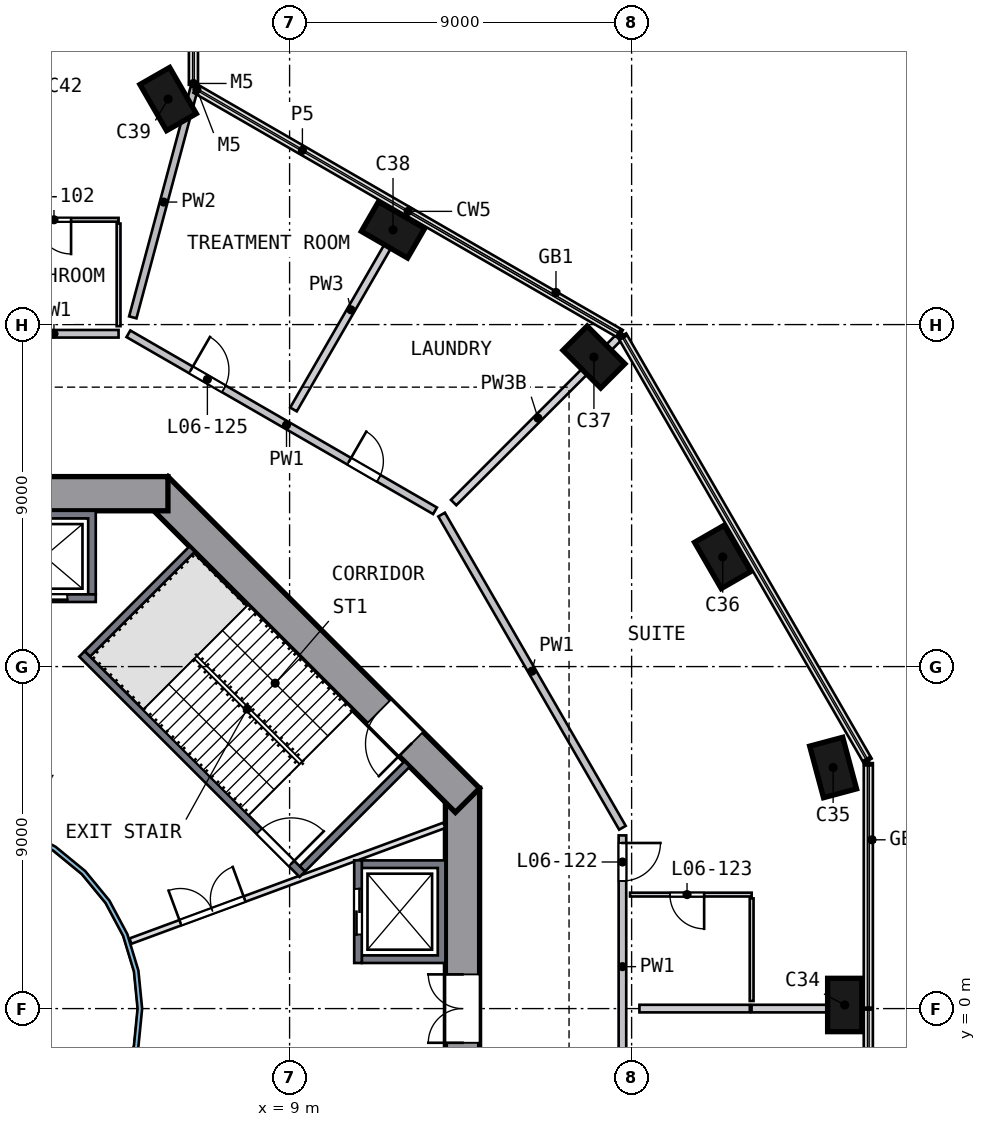
"""IFC4 building model, lengths in metres.
Left out: names, types, materials, properties, quantities, classifications, styles, units other than length and angle.
Written with IfcOpenShell. Run it as: python <this file> out.ifc"""

import sys

from ifc_helpers import new_model, si_unit, direction, frame, frame_2d, origin, origin_2d, place, context, subcontext, project, spatial, polyline, rectangle, outline, extrude, element, fill, save


model = new_model("IFC4")
c1 = context("Model", 3, precision=1e-05, world=origin(), true_north=direction((0.0, 1.0)))
c2 = subcontext(c1, "Body", "Model", "MODEL_VIEW")
j1 = project(units=[si_unit("LENGTHUNIT", "METRE"), si_unit("PLANEANGLEUNIT", "RADIAN")], contexts=[c1])
p1 = place(None, origin())
s1 = spatial("IfcSite", under=j1, at=p1, CompositionType="ELEMENT")
p2 = place(p1, origin())
s2 = spatial("IfcBuilding", under=s1, at=p2, CompositionType="ELEMENT")
p3 = place(p2, frame((0.0, 0.0, 34.0)))
s3 = spatial("IfcBuildingStorey", under=s2, at=p3, CompositionType="ELEMENT", Elevation=34.0)
p4 = place(p3, frame((23.608, 0.0, 0.0), z_axis=(-0.000674622, 0.078878899, 0.996883977), x_axis=(-0.000122014, 0.99688419, -0.078878998)))
e1 = element("IfcColumn", 1, at=p4, inside=s3, PredefinedType="COLUMN", context=c2, shape_type="SweptSolid", body=[
    extrude(rectangle(XDim=1.4, YDim=0.9, at=origin_2d()), origin(), (0.0, 0.0, 1.0), 4.705),
])
p5 = place(p3, frame((23.328, 6.251, 0.0), z_axis=(-0.021532865, 0.077777746, 0.996738159), x_axis=(0.257834381, -0.962812988, 0.080700569)))
e2 = element("IfcColumn", 2, at=p5, inside=s3, PredefinedType="COLUMN", context=c2, shape_type="SweptSolid", body=[
    extrude(rectangle(XDim=1.4, YDim=0.9, at=origin_2d()), origin(), (0.0, 0.0, 1.0), 4.705),
])
p6 = place(p3, frame((20.445, 11.804, 0.0), z_axis=(-0.040010426, 0.067929504, 0.99688753), x_axis=(-0.498670621, 0.863199165, -0.078834084)))
e3 = element("IfcColumn", 3, at=p6, inside=s3, PredefinedType="COLUMN", context=c2, shape_type="SweptSolid", body=[
    extrude(rectangle(XDim=1.4, YDim=0.9, at=origin_2d()), origin(), (0.0, 0.0, 1.0), 4.705),
])
p7 = place(p3, frame((17.077, 17.077, 0.0), z_axis=(-0.057490254, 0.056608184, 0.996739878), x_axis=(0.704306489, -0.705296544, 0.08067934)))
e4 = element("IfcColumn", 4, at=p7, inside=s3, PredefinedType="COLUMN", context=c2, shape_type="SweptSolid", body=[
    extrude(rectangle(XDim=1.4, YDim=0.9, at=origin_2d()), origin(), (0.0, 0.0, 1.0), 4.705),
])
p8 = place(p3, frame((11.804, 20.445, 0.0), z_axis=(-0.068655708, 0.038868575, 0.996882956), x_axis=(-0.863336283, 0.498424045, -0.078891906)))
e5 = element("IfcColumn", 5, at=p8, inside=s3, PredefinedType="COLUMN", context=c2, shape_type="SweptSolid", body=[
    extrude(rectangle(XDim=1.4, YDim=0.9, at=origin_2d()), origin(), (0.0, 0.0, 1.0), 4.705),
])
p9 = place(p3, frame((5.9, 23.912, 0.0), z_axis=(-0.079998823, 0.019039928, 0.996613099), x_axis=(0.49616409, -0.866396292, 0.056379618)))
e6 = element("IfcColumn", 6, at=p9, inside=s3, PredefinedType="COLUMN", context=c2, shape_type="SweptSolid", body=[
    extrude(rectangle(XDim=1.4, YDim=0.9, at=origin_2d()), origin(), (0.0, 0.0, 1.0), 4.706),
])
p10 = place(p3, frame((13.55, -5.799, 0.0), z_axis=(0.0, 0.0, 1.0), x_axis=(0.0, 1.0, 0.0)))
e7 = element("IfcWall", 7, at=p10, inside=s3, PredefinedType="SHEAR", context=c2, shape_type="SweptSolid", body=[
    extrude(rectangle(XDim=11.598, YDim=0.9, at=frame_2d((5.799, 0.0))), origin(), (0.0, 0.0, 1.0), 5.0),
])
p11 = place(p10, frame((4.899, 0.0, 0.0)))
e8 = element("IfcOpeningElement", 8, at=p11, cuts=e7, PredefinedType="OPENING", context=c2, shape_type="SweptSolid", body=[
    extrude(rectangle(XDim=1.8, YDim=2.1, at=frame_2d((0.9, 1.05))), frame((0.0, 0.46, 0.0), z_axis=(0.0, -1.0, 0.0), x_axis=(1.0, 0.0, 0.0)), (0.0, 0.0, 1.0), 0.92),
])
p12 = place(p3, frame((13.682, 5.481, 0.0), z_axis=(0.0, 0.0, 1.0), x_axis=(-0.707106781, 0.707106781, 0.0)))
e9 = element("IfcWall", 9, at=p12, inside=s3, PredefinedType="SHEAR", context=c2, shape_type="SweptSolid", body=[
    extrude(rectangle(XDim=11.598, YDim=0.9, at=frame_2d((5.799, 0.0))), origin(), (0.0, 0.0, 1.0), 5.0),
])
p13 = place(p12, frame((2.099, 0.0, 0.0)))
e10 = element("IfcOpeningElement", 10, at=p13, cuts=e9, PredefinedType="OPENING", context=c2, shape_type="SweptSolid", body=[
    extrude(rectangle(XDim=1.2, YDim=2.1, at=frame_2d((0.6, 1.05))), frame((0.0, 0.46, 0.0), z_axis=(0.0, -1.0, 0.0), x_axis=(1.0, 0.0, 0.0)), (0.0, 0.0, 1.0), 0.92),
])
p14 = place(p3, frame((5.799, 13.55, 0.0), z_axis=(0.0, 0.0, 1.0), x_axis=(-1.0, 0.0, 0.0)))
e11 = element("IfcWall", 11, at=p14, inside=s3, PredefinedType="SHEAR", context=c2, shape_type="SweptSolid", body=[
    extrude(rectangle(XDim=11.598, YDim=0.9, at=frame_2d((5.799, 0.0))), origin(), (0.0, 0.0, 1.0), 5.0),
])
p15 = place(p14, frame((4.899, 0.0, 0.0)))
e12 = element("IfcOpeningElement", 12, at=p15, cuts=e11, PredefinedType="OPENING", context=c2, shape_type="SweptSolid", body=[
    extrude(rectangle(XDim=1.8, YDim=2.1, at=frame_2d((0.9, 1.05))), frame((0.0, 0.46, 0.0), z_axis=(0.0, -1.0, 0.0), x_axis=(1.0, 0.0, 0.0)), (0.0, 0.0, 1.0), 0.92),
])
p16 = place(p3, origin())
e13 = element("IfcWall", 13, at=p16, inside=s3, PredefinedType="SOLIDWALL", context=c2, shape_type="SweptSolid", body=[
    extrude(outline(polyline([(13.1, 3.9), (13.1, 1.2), (10.9, 1.2), (10.9, 1.4), (12.9, 1.4), (12.9, 3.7), (10.9, 3.7), (10.9, 3.9), (13.1, 3.9)])), origin(), (0.0, 0.0, 1.0), 4.69),
])
p17 = place(p3, frame((10.8, 1.2, 0.0), z_axis=(0.0, 0.0, 1.0), x_axis=(0.0, 1.0, 0.0)))
e14 = element("IfcWall", 14, at=p17, inside=s3, PredefinedType="SOLIDWALL", context=c2, shape_type="SweptSolid", body=[
    extrude(rectangle(XDim=2.7, YDim=0.2, at=frame_2d((1.35, 0.0))), origin(), (0.0, 0.0, 1.0), 4.69),
])
p18 = place(p17, frame((0.75, 0.0, 0.0)))
e15 = element("IfcOpeningElement", 15, at=p18, cuts=e14, PredefinedType="OPENING", context=c2, shape_type="SweptSolid", body=[
    extrude(rectangle(XDim=1.2, YDim=2.1, at=frame_2d((0.6, 1.05))), frame((0.0, 0.11, 0.0), z_axis=(0.0, -1.0, 0.0), x_axis=(1.0, 0.0, 0.0)), (0.0, 0.0, 1.0), 0.22),
])
p19 = place(p3, origin())
e16 = element("IfcWall", 16, at=p19, inside=s3, PredefinedType="SOLIDWALL", context=c2, shape_type="SweptSolid", body=[
    extrude(outline(polyline([(3.9, 13.1), (3.9, 10.9), (3.7, 10.9), (3.7, 12.9), (1.4, 12.9), (1.4, 10.9), (1.2, 10.9), (1.2, 13.1), (3.9, 13.1)])), origin(), (0.0, 0.0, 1.0), 4.69),
])
p20 = place(p3, frame((1.2, 10.8, 0.0), z_axis=(0.0, 0.0, 1.0), x_axis=(1.0, 0.0, 0.0)))
e17 = element("IfcWall", 17, at=p20, inside=s3, PredefinedType="SOLIDWALL", context=c2, shape_type="SweptSolid", body=[
    extrude(rectangle(XDim=2.7, YDim=0.2, at=frame_2d((1.35, 0.0))), origin(), (0.0, 0.0, 1.0), 4.69),
])
p21 = place(p20, frame((0.75, 0.0, 0.0)))
e18 = element("IfcOpeningElement", 18, at=p21, cuts=e17, PredefinedType="OPENING", context=c2, shape_type="SweptSolid", body=[
    extrude(rectangle(XDim=1.2, YDim=2.1, at=frame_2d((0.6, 1.05))), frame((0.0, 0.11, 0.0), z_axis=(0.0, -1.0, 0.0), x_axis=(1.0, 0.0, 0.0)), (0.0, 0.0, 1.0), 0.22),
])
p22 = place(p3, frame((3.535, 9.334, 0.0), z_axis=(0.0, 0.0, 1.0), x_axis=(0.707106781, -0.707106781, 0.0)))
e19 = element("IfcWall", 19, at=p22, inside=s3, PredefinedType="SOLIDWALL", context=c2, shape_type="SweptSolid", body=[
    extrude(rectangle(XDim=8.2, YDim=0.2, at=frame_2d((4.1, 0.0))), origin(), (0.0, 0.0, 1.0), 4.69),
])
p23 = place(p22, frame((6.6, 0.0, 0.0)))
e20 = element("IfcOpeningElement", 20, at=p23, cuts=e19, PredefinedType="OPENING", context=c2, shape_type="SweptSolid", body=[
    extrude(rectangle(XDim=1.2, YDim=2.1, at=frame_2d((0.6, 1.05))), frame((0.0, 0.11, 0.0), z_axis=(0.0, -1.0, 0.0), x_axis=(1.0, 0.0, 0.0)), (0.0, 0.0, 1.0), 0.22),
])
for number, where, z_axis, x_axis in (
    (21, (9.334, 3.677, 0.0), (0.0, 0.0, 1.0), (0.707, 0.707, 0.0)),
    (22, (3.677, 9.334, 0.0), (0.0, 0.0, 1.0), (0.707, 0.707, 0.0)),
):
    element("IfcWall", number, at=place(p3, frame(where, z_axis=z_axis, x_axis=x_axis)), inside=s3, PredefinedType="SOLIDWALL", context=c2, shape_type="SweptSolid", body=[
        extrude(rectangle(XDim=3.9, YDim=0.2, at=frame_2d((1.95, 0.0))), origin(), (0.0, 0.0, 1.0), 4.69),
    ])
p24 = place(p3, frame((4.813, 1.776, 0.0), z_axis=(0.0, 0.0, 1.0), x_axis=(0.93819293, 0.346112737, 0.0)))
e23 = element("IfcWall", 23, at=p24, inside=s3, PredefinedType="PARTITIONING", context=c2, shape_type="SweptSolid", body=[
    extrude(rectangle(XDim=8.803, YDim=0.15, at=frame_2d((4.402, 0.0))), origin(), (0.0, 0.0, 1.0), 4.69),
])
p25 = place(p24, frame((1.4, 0.0, 0.0)))
e24 = element("IfcOpeningElement", 24, at=p25, cuts=e23, PredefinedType="OPENING", context=c2, shape_type="SweptSolid", body=[
    extrude(rectangle(XDim=1.8, YDim=2.1, at=frame_2d((0.9, 1.05))), frame((0.0, 0.085, 0.0), z_axis=(0.0, -1.0, 0.0), x_axis=(1.0, 0.0, 0.0)), (0.0, 0.0, 1.0), 0.17),
])
p26 = place(p3, origin())
e25 = element("IfcWall", 25, at=p26, inside=s3, PredefinedType="SOLIDWALL", context=c2, shape_type="SweptSolid", body=[
    extrude(outline(polyline([(5.021, -0.999), (4.73, -1.959), (4.257, -2.844), (3.62, -3.62), (2.844, -4.257), (1.959, -4.73), (0.999, -5.021), (0.0, -5.12), (-0.999, -5.021), (-1.959, -4.73), (-2.844, -4.257), (-3.62, -3.62), (-4.257, -2.844), (-4.73, -1.959), (-5.021, -0.999), (-5.12, 0.0), (-5.021, 0.999), (-4.73, 1.959), (-4.257, 2.844), (-3.62, 3.62), (-2.844, 4.257), (-1.959, 4.73), (-0.999, 5.021), (0.0, 5.12), (0.999, 5.021), (1.959, 4.73), (2.844, 4.257), (3.62, 3.62), (4.257, 2.844), (4.73, 1.959), (5.021, 0.999), (5.12, 0.0), (5.021, -0.999)]), holes=[polyline([(4.904, 0.976), (4.619, 1.913), (4.157, 2.778), (3.535, 3.535), (2.778, 4.157), (1.913, 4.619), (0.976, 4.904), (0.0, 5.0), (-0.976, 4.904), (-1.913, 4.619), (-2.778, 4.157), (-3.535, 3.535), (-4.157, 2.778), (-4.619, 1.913), (-4.904, 0.976), (-5.0, 0.0), (-4.904, -0.976), (-4.619, -1.913), (-4.157, -2.778), (-3.535, -3.535), (-2.778, -4.157), (-1.913, -4.619), (-0.976, -4.904), (0.0, -5.0), (0.976, -4.904), (1.913, -4.619), (2.778, -4.157), (3.535, -3.535), (4.157, -2.778), (4.619, -1.913), (4.904, -0.976), (5.0, 0.0), (4.904, 0.976)])]), origin(), (0.0, 0.0, 1.0), 4.69),
])
p27 = place(p3, frame((4.5, 17.758, 0.0), z_axis=(0.0, 0.0, 1.0), x_axis=(-1.0, 0.0, 0.0)))
e26 = element("IfcWall", 26, at=p27, inside=s3, PredefinedType="SOLIDWALL", context=c2, shape_type="SweptSolid", body=[
    extrude(rectangle(XDim=3.4, YDim=0.2, at=frame_2d((1.7, 0.0))), origin(), (0.0, 0.0, 1.0), 4.69),
])
p28 = place(p3, frame((4.758, 17.758, 0.0), z_axis=(0.0, 0.0, 1.0), x_axis=(0.866035038, -0.499983313, 0.0)))
e27 = element("IfcWall", 27, at=p28, inside=s3, PredefinedType="SOLIDWALL", context=c2, shape_type="SweptSolid", body=[
    extrude(rectangle(XDim=9.317, YDim=0.2, at=frame_2d((4.658, 0.0))), origin(), (0.0, 0.0, 1.0), 4.69),
])
p29 = place(p28, frame((6.708, 0.0, 0.0)))
e28 = element("IfcOpeningElement", 28, at=p29, cuts=e27, PredefinedType="OPENING", context=c2, shape_type="SweptSolid", body=[
    extrude(rectangle(XDim=0.9, YDim=2.1, at=frame_2d((0.45, 1.05))), frame((0.0, 0.11, 0.0), z_axis=(0.0, -1.0, 0.0), x_axis=(1.0, 0.0, 0.0)), (0.0, 0.0, 1.0), 0.22),
])
p30 = place(p28, frame((1.9, 0.0, 0.0)))
e29 = element("IfcOpeningElement", 29, at=p30, cuts=e27, PredefinedType="OPENING", context=c2, shape_type="SweptSolid", body=[
    extrude(rectangle(XDim=1.0, YDim=2.1, at=frame_2d((0.5, 1.05))), frame((0.0, 0.11, 0.0), z_axis=(0.0, -1.0, 0.0), x_axis=(1.0, 0.0, 0.0)), (0.0, 0.0, 1.0), 0.22),
])
p31 = place(p3, frame((17.758, 4.759, 0.0), z_axis=(0.0, 0.0, 1.0), x_axis=(-0.499999313, 0.8660258, 0.0)))
e30 = element("IfcWall", 30, at=p31, inside=s3, PredefinedType="SOLIDWALL", context=c2, shape_type="SweptSolid", body=[
    extrude(rectangle(XDim=9.516, YDim=0.2, at=frame_2d((4.758, 0.0))), origin(), (0.0, 0.0, 1.0), 4.69),
])
p32 = place(p3, frame((17.758, 4.558, 0.0), z_axis=(0.0, 0.0, 1.0), x_axis=(0.0, -1.0, 0.0)))
e31 = element("IfcWall", 31, at=p32, inside=s3, PredefinedType="SOLIDWALL", context=c2, shape_type="SweptSolid", body=[
    extrude(rectangle(XDim=9.116, YDim=0.2, at=frame_2d((4.558, 0.0))), origin(), (0.0, 0.0, 1.0), 4.69),
])
p33 = place(p32, frame((0.2, 0.0, 0.0)))
e32 = element("IfcOpeningElement", 32, at=p33, cuts=e31, PredefinedType="OPENING", context=c2, shape_type="SweptSolid", body=[
    extrude(rectangle(XDim=1.0, YDim=2.1, at=frame_2d((0.5, 1.05))), frame((0.0, 0.11, 0.0), z_axis=(0.0, -1.0, 0.0), x_axis=(1.0, 0.0, 0.0)), (0.0, 0.0, 1.0), 0.22),
])
p34 = place(p32, frame((8.008, 0.0, 0.0)))
e33 = element("IfcOpeningElement", 33, at=p34, cuts=e31, PredefinedType="OPENING", context=c2, shape_type="SweptSolid", body=[
    extrude(rectangle(XDim=0.9, YDim=2.1, at=frame_2d((0.45, 1.05))), frame((0.0, 0.11, 0.0), z_axis=(0.0, -1.0, 0.0), x_axis=(1.0, 0.0, 0.0)), (0.0, 0.0, 1.0), 0.22),
])
p35 = place(p32, frame((5.708, 0.0, 0.0)))
e34 = element("IfcOpeningElement", 34, at=p35, cuts=e31, PredefinedType="OPENING", context=c2, shape_type="SweptSolid", body=[
    extrude(rectangle(XDim=0.9, YDim=2.1, at=frame_2d((0.45, 1.05))), frame((0.0, 0.11, 0.0), z_axis=(0.0, -1.0, 0.0), x_axis=(1.0, 0.0, 0.0)), (0.0, 0.0, 1.0), 0.22),
])
p36 = place(p3, frame((4.874, 18.19, 0.0), z_axis=(0.0, 0.0, 1.0), x_axis=(0.258833215, 0.965922029, 0.0)))
e35 = element("IfcWall", 35, at=p36, inside=s3, PredefinedType="SOLIDWALL", context=c2, shape_type="SweptSolid", body=[
    extrude(rectangle(XDim=6.282, YDim=0.2, at=frame_2d((3.141, 0.0))), origin(), (0.0, 0.0, 1.0), 4.69),
])
p37 = place(p3, frame((4.5, 20.758, 0.0), z_axis=(0.0, 0.0, 1.0), x_axis=(-1.0, 0.0, 0.0)))
e36 = element("IfcWall", 36, at=p37, inside=s3, PredefinedType="PARTITIONING", context=c2, shape_type="SweptSolid", body=[
    extrude(rectangle(XDim=3.2, YDim=0.1, at=frame_2d((1.6, 0.0))), origin(), (0.0, 0.0, 1.0), 4.69),
])
p38 = place(p37, frame((1.25, 0.0, 0.0)))
e37 = element("IfcOpeningElement", 37, at=p38, cuts=e36, PredefinedType="OPENING", context=c2, shape_type="SweptSolid", body=[
    extrude(rectangle(XDim=0.9, YDim=2.1, at=frame_2d((0.45, 1.05))), frame((0.0, 0.06, 0.0), z_axis=(0.0, -1.0, 0.0), x_axis=(1.0, 0.0, 0.0)), (0.0, 0.0, 1.0), 0.12),
])
p39 = place(p3, frame((4.5, 20.658, 0.0), z_axis=(0.0, 0.0, 1.0), x_axis=(0.0, -1.0, 0.0)))
e38 = element("IfcWall", 38, at=p39, inside=s3, PredefinedType="PARTITIONING", context=c2, shape_type="SweptSolid", body=[
    extrude(rectangle(XDim=2.7, YDim=0.1, at=frame_2d((1.35, 0.0))), origin(), (0.0, 0.0, 1.0), 4.69),
])
p40 = place(p3, frame((21.158, 3.0, 0.0), z_axis=(0.0, 0.0, 1.0), x_axis=(-1.0, 0.0, 0.0)))
e39 = element("IfcWall", 39, at=p40, inside=s3, PredefinedType="PARTITIONING", context=c2, shape_type="SweptSolid", body=[
    extrude(rectangle(XDim=3.2, YDim=0.1, at=frame_2d((1.6, 0.0))), origin(), (0.0, 0.0, 1.0), 4.69),
])
p41 = place(p40, frame((1.25, 0.0, 0.0)))
e40 = element("IfcOpeningElement", 40, at=p41, cuts=e39, PredefinedType="OPENING", context=c2, shape_type="SweptSolid", body=[
    extrude(rectangle(XDim=0.9, YDim=2.1, at=frame_2d((0.45, 1.05))), frame((0.0, 0.06, 0.0), z_axis=(0.0, -1.0, 0.0), x_axis=(1.0, 0.0, 0.0)), (0.0, 0.0, 1.0), 0.12),
])
p42 = place(p3, frame((21.158, 2.9, 0.0), z_axis=(0.0, 0.0, 1.0), x_axis=(0.0, -1.0, 0.0)))
e41 = element("IfcWall", 41, at=p42, inside=s3, PredefinedType="PARTITIONING", context=c2, shape_type="SweptSolid", body=[
    extrude(rectangle(XDim=2.7, YDim=0.1, at=frame_2d((1.35, 0.0))), origin(), (0.0, 0.0, 1.0), 4.69),
])
p43 = place(p3, frame((9.103, 15.767, 0.0), z_axis=(0.0, 0.0, 1.0), x_axis=(0.500008765, 0.866020343, 0.0)))
e42 = element("IfcWall", 42, at=p43, inside=s3, PredefinedType="SOLIDWALL", context=c2, shape_type="SweptSolid", body=[
    extrude(rectangle(XDim=6.053, YDim=0.2, at=frame_2d((3.026, 0.0))), origin(), (0.0, 0.0, 1.0), 4.69),
])
p44 = place(p3, frame((17.758, 17.758, 0.0), z_axis=(0.0, 0.0, 1.0), x_axis=(-0.707106781, -0.707106781, 0.0)))
e43 = element("IfcWall", 43, at=p44, inside=s3, PredefinedType="SOLIDWALL", context=c2, shape_type="SweptSolid", body=[
    extrude(rectangle(XDim=6.282, YDim=0.2, at=frame_2d((3.141, 0.0))), origin(), (0.0, 0.0, 1.0), 4.19),
])
p45 = place(p3, frame((18.206, 0.0, 0.0), z_axis=(0.0, 0.0, 1.0), x_axis=(1.0, 0.0, 0.0)))
e44 = element("IfcWall", 44, at=p45, inside=s3, PredefinedType="SOLIDWALL", context=c2, shape_type="SweptSolid", body=[
    extrude(rectangle(XDim=2.905, YDim=0.2, at=frame_2d((1.452, 0.0))), origin(), (0.0, 0.0, 1.0), 4.69),
])
p46 = place(p3, frame((21.156, 0.0, 0.0), z_axis=(0.0, 0.0, 1.0), x_axis=(1.0, 0.0, 0.0)))
e45 = element("IfcWall", 45, at=p46, inside=s3, PredefinedType="SOLIDWALL", context=c2, shape_type="SweptSolid", body=[
    extrude(rectangle(XDim=3.102, YDim=0.2, at=frame_2d((1.551, 0.0))), origin(), (0.0, 0.0, 1.0), 4.69),
])
p47 = place(p18, origin())
e46 = element("IfcDoor", 46, at=p47, inside=s3, OperationType="DOUBLE_DOOR_SLIDING", PredefinedType="DOOR", context=c2, shape_type="SweptSolid", body=[
    extrude(rectangle(XDim=1.2, YDim=2.1, at=frame_2d((0.6, 1.05))), frame((0.0, 0.025, 0.0), z_axis=(0.0, -1.0, 0.0), x_axis=(1.0, 0.0, 0.0)), (0.0, 0.0, 1.0), 0.05),
])
fill(e15, e46)
p48 = place(p21, origin())
e47 = element("IfcDoor", 47, at=p48, inside=s3, OperationType="DOUBLE_DOOR_SLIDING", PredefinedType="DOOR", context=c2, shape_type="SweptSolid", body=[
    extrude(rectangle(XDim=1.2, YDim=2.1, at=frame_2d((0.6, 1.05))), frame((0.0, 0.025, 0.0), z_axis=(0.0, -1.0, 0.0), x_axis=(1.0, 0.0, 0.0)), (0.0, 0.0, 1.0), 0.05),
])
fill(e18, e47)
p49 = place(p23, origin())
e48 = element("IfcDoor", 48, at=p49, inside=s3, OperationType="SINGLE_SWING_RIGHT", PredefinedType="DOOR", context=c2, shape_type="SweptSolid", body=[
    extrude(rectangle(XDim=1.2, YDim=2.1, at=frame_2d((0.6, 1.05))), frame((0.0, 0.025, 0.0), z_axis=(0.0, -1.0, 0.0), x_axis=(1.0, 0.0, 0.0)), (0.0, 0.0, 1.0), 0.05),
])
fill(e20, e48)
p50 = place(p11, origin())
e49 = element("IfcDoor", 49, at=p50, inside=s3, OperationType="DOUBLE_DOOR_SINGLE_SWING", PredefinedType="DOOR", context=c2, shape_type="SweptSolid", body=[
    extrude(rectangle(XDim=1.8, YDim=2.1, at=frame_2d((0.9, 1.05))), frame((0.0, 0.025, 0.0), z_axis=(0.0, -1.0, 0.0), x_axis=(1.0, 0.0, 0.0)), (0.0, 0.0, 1.0), 0.05),
])
fill(e8, e49)
p51 = place(p13, origin())
e50 = element("IfcDoor", 50, at=p51, inside=s3, OperationType="SINGLE_SWING_LEFT", PredefinedType="DOOR", context=c2, shape_type="SweptSolid", body=[
    extrude(rectangle(XDim=1.2, YDim=2.1, at=frame_2d((0.6, 1.05))), frame((0.0, 0.025, 0.0), z_axis=(0.0, -1.0, 0.0), x_axis=(1.0, 0.0, 0.0)), (0.0, 0.0, 1.0), 0.05),
])
fill(e10, e50)
p52 = place(p25, origin())
e51 = element("IfcDoor", 51, at=p52, inside=s3, OperationType="DOUBLE_DOOR_SINGLE_SWING", PredefinedType="DOOR", context=c2, shape_type="SweptSolid", body=[
    extrude(rectangle(XDim=1.8, YDim=2.1, at=frame_2d((0.9, 1.05))), frame((0.0, 0.025, 0.0), z_axis=(0.0, -1.0, 0.0), x_axis=(1.0, 0.0, 0.0)), (0.0, 0.0, 1.0), 0.05),
])
fill(e24, e51)
p53 = place(p38, origin())
e52 = element("IfcDoor", 52, at=p53, inside=s3, OperationType="SINGLE_SWING_LEFT", PredefinedType="DOOR", context=c2, shape_type="SweptSolid", body=[
    extrude(rectangle(XDim=0.9, YDim=2.1, at=frame_2d((0.45, 1.05))), frame((0.0, 0.025, 0.0), z_axis=(0.0, -1.0, 0.0), x_axis=(1.0, 0.0, 0.0)), (0.0, 0.0, 1.0), 0.05),
])
fill(e37, e52)
p54 = place(p33, origin())
e53 = element("IfcDoor", 53, at=p54, inside=s3, OperationType="SINGLE_SWING_LEFT", PredefinedType="DOOR", context=c2, shape_type="SweptSolid", body=[
    extrude(rectangle(XDim=1.0, YDim=2.1, at=frame_2d((0.5, 1.05))), frame((0.0, 0.025, 0.0), z_axis=(0.0, -1.0, 0.0), x_axis=(1.0, 0.0, 0.0)), (0.0, 0.0, 1.0), 0.05),
])
fill(e32, e53)
p55 = place(p41, origin())
e54 = element("IfcDoor", 54, at=p55, inside=s3, OperationType="SINGLE_SWING_LEFT", PredefinedType="DOOR", context=c2, shape_type="SweptSolid", body=[
    extrude(rectangle(XDim=0.9, YDim=2.1, at=frame_2d((0.45, 1.05))), frame((0.0, 0.025, 0.0), z_axis=(0.0, -1.0, 0.0), x_axis=(1.0, 0.0, 0.0)), (0.0, 0.0, 1.0), 0.05),
])
fill(e40, e54)
p56 = place(p29, origin())
e55 = element("IfcDoor", 55, at=p56, inside=s3, OperationType="SINGLE_SWING_LEFT", PredefinedType="DOOR", context=c2, shape_type="SweptSolid", body=[
    extrude(rectangle(XDim=0.9, YDim=2.1, at=frame_2d((0.45, 1.05))), frame((0.0, 0.025, 0.0), z_axis=(0.0, -1.0, 0.0), x_axis=(1.0, 0.0, 0.0)), (0.0, 0.0, 1.0), 0.05),
])
fill(e28, e55)
p57 = place(p30, origin())
e56 = element("IfcDoor", 56, at=p57, inside=s3, OperationType="SINGLE_SWING_LEFT", PredefinedType="DOOR", context=c2, shape_type="SweptSolid", body=[
    extrude(rectangle(XDim=1.0, YDim=2.1, at=frame_2d((0.5, 1.05))), frame((0.0, 0.025, 0.0), z_axis=(0.0, -1.0, 0.0), x_axis=(1.0, 0.0, 0.0)), (0.0, 0.0, 1.0), 0.05),
])
fill(e29, e56)
save(model, sys.argv[1])
